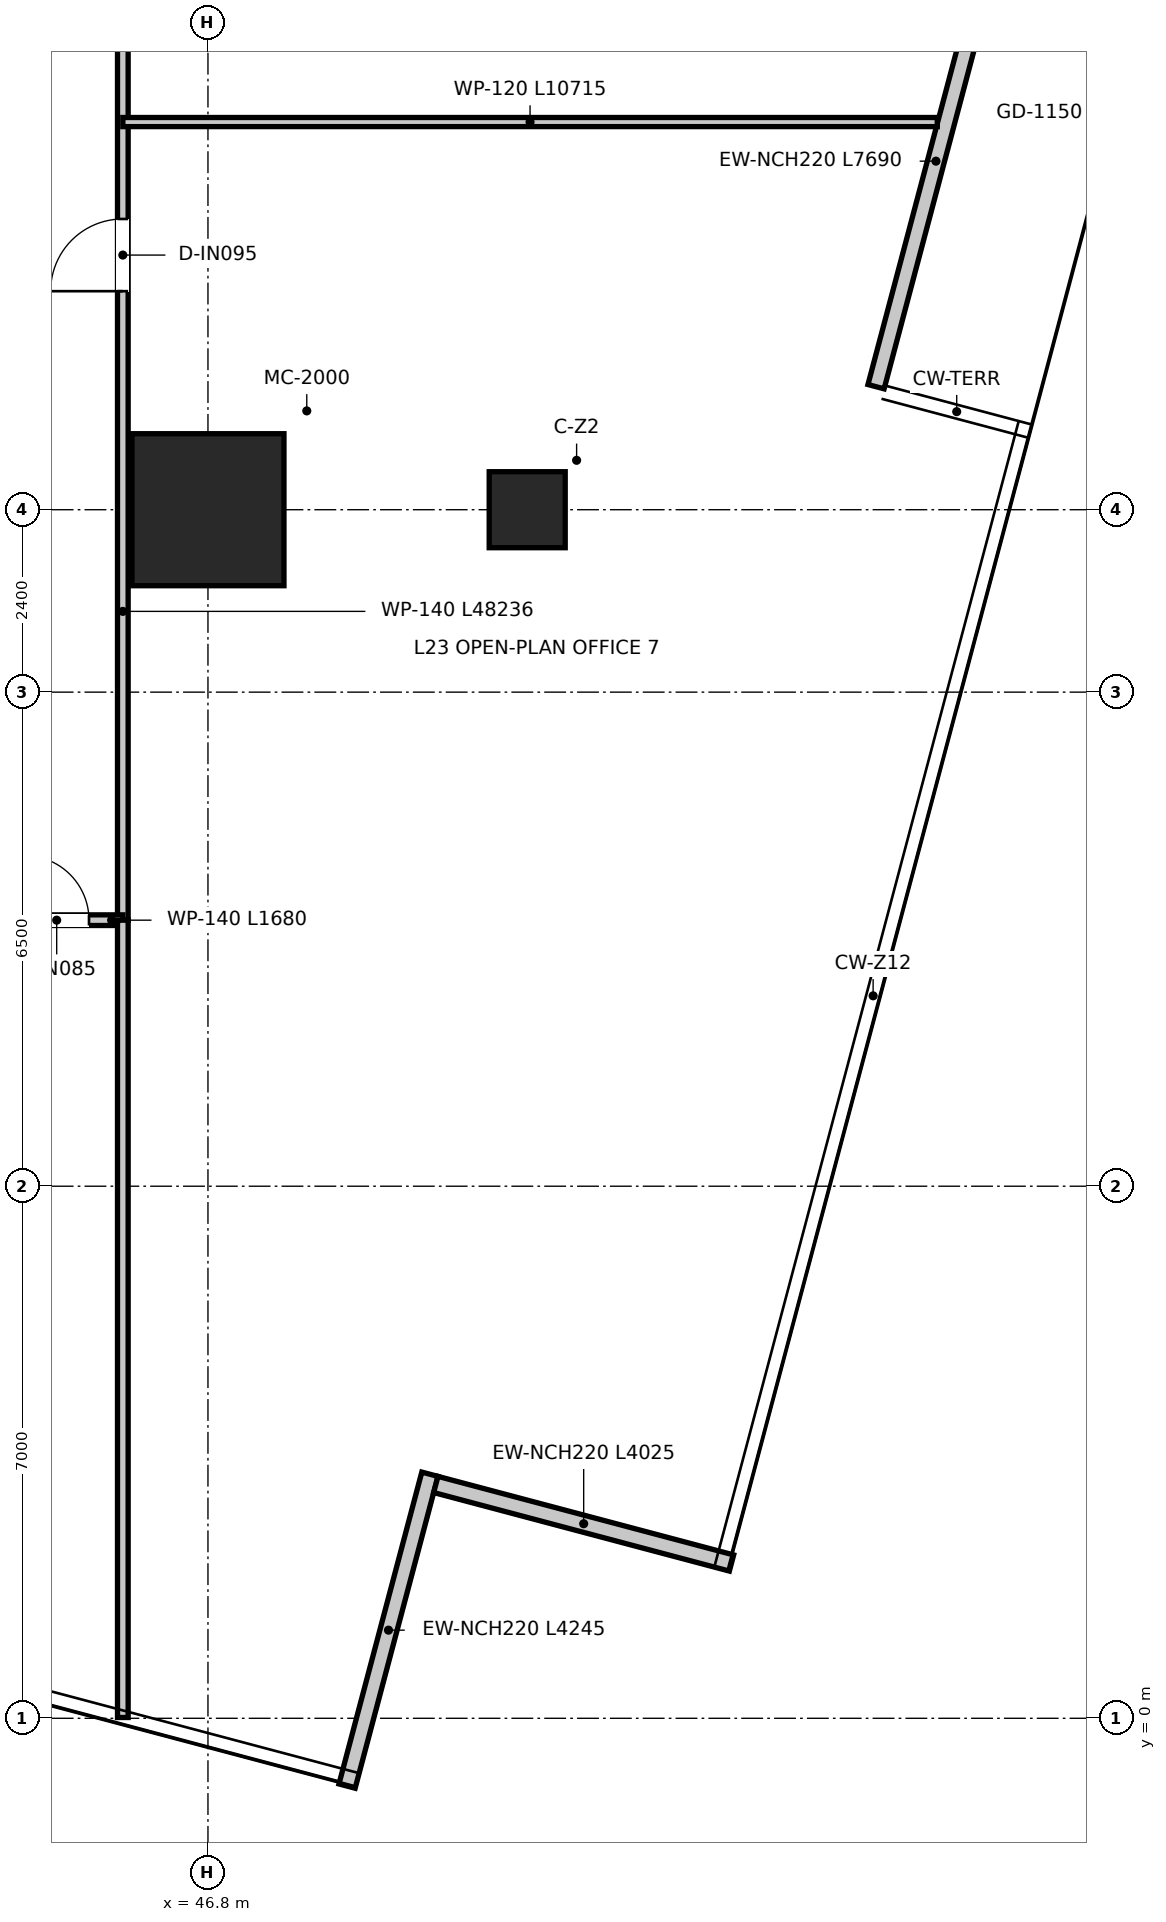
"""IFC4 building model, lengths in metres.
Left out: names, types, materials, properties, quantities, classifications, styles, units other than length and angle.
Written with IfcOpenShell. Run it as: python <this file> out.ifc"""

import sys

from ifc_helpers import new_model, si_unit, direction, frame, frame_2d, origin, origin_2d, place, context, subcontext, project, spatial, rectangle, extrude, source, transform, mapped, element, fill, save


model = new_model("IFC4")
c1 = context("Model", 3, precision=1e-05, world=origin(), true_north=direction((0.0, 1.0)))
c2 = subcontext(c1, "Body", "Model", "MODEL_VIEW")
j1 = project(units=[si_unit("LENGTHUNIT", "METRE"), si_unit("PLANEANGLEUNIT", "RADIAN")], contexts=[c1])
p1 = place(None, origin())
s1 = spatial("IfcSite", under=j1, at=p1, CompositionType="ELEMENT")
p2 = place(p1, origin())
s2 = spatial("IfcBuilding", under=s1, at=p2, CompositionType="ELEMENT")
p3 = place(p2, frame((0.0, 0.0, 97.95)))
s3 = spatial("IfcBuildingStorey", under=s2, at=p3, CompositionType="ELEMENT", Elevation=97.95)
m1 = source(origin(), c2, "Body", "SweptSolid", [
    extrude(rectangle(XDim=2.0, YDim=2.0, at=origin_2d()), origin(), (0.0, 0.0, 1.0), 3.95),
])
p4 = place(p3, frame((46.8, 15.9, 0.0), z_axis=(0.0, 0.0, 1.0), x_axis=(1.0, 0.0, 0.0)))
e1 = element("IfcColumn", 1, at=p4, inside=s3, PredefinedType="USERDEFINED", context=c2, shape_type="MappedRepresentation", body=[
    mapped(m1, transform((0.0, 0.0, 0.0), x_axis=(1.0, 0.0, 0.0), y_axis=(0.0, 1.0, 0.0), z_axis=(0.0, 0.0, 1.0), scale=1.0)),
])
m2 = source(origin(), c2, "Body", "SweptSolid", [
    extrude(rectangle(XDim=1.0, YDim=1.0, at=origin_2d()), origin(), (0.0, 0.0, 1.0), 3.95),
])
p5 = place(p3, frame((51.0, 15.9, 0.0), z_axis=(0.0, 0.0, 1.0), x_axis=(1.0, 0.0, 0.0)))
e2 = element("IfcColumn", 2, at=p5, inside=s3, PredefinedType="COLUMN", context=c2, shape_type="MappedRepresentation", body=[
    mapped(m2, transform((0.0, 0.0, 0.0), x_axis=(1.0, 0.0, 0.0), y_axis=(0.0, 1.0, 0.0), z_axis=(0.0, 0.0, 1.0), scale=1.0)),
])
p6 = place(p3, frame((48.63, -0.892, 0.0), z_axis=(0.0, 0.0, 1.0), x_axis=(0.256692391399, 0.966493153725, 0.0)))
e3 = element("IfcWall", 3, at=p6, inside=s3, PredefinedType="ELEMENTEDWALL", context=c2, shape_type="SweptSolid", body=[
    extrude(rectangle(XDim=4.245, YDim=0.22, at=frame_2d((2.123, 0.0))), origin(), (0.0, 0.0, 1.0), 3.67),
])
p7 = place(p3, frame((49.798, 3.076, 0.0), z_axis=(0.0, 0.0, 1.0), x_axis=(0.966492181189, -0.256696053144, 0.0)))
e4 = element("IfcWall", 4, at=p7, inside=s3, PredefinedType="ELEMENTEDWALL", context=c2, shape_type="SweptSolid", body=[
    extrude(rectangle(XDim=4.025, YDim=0.22, at=frame_2d((2.012, 0.0))), origin(), (0.0, 0.0, 1.0), 3.67),
])
p8 = place(p3, frame((57.563, 24.951, 0.0), z_axis=(0.0, 0.0, 1.0), x_axis=(-0.256717978083, -0.966486357756, 0.0)))
e5 = element("IfcWall", 5, at=p8, inside=s3, PredefinedType="ELEMENTEDWALL", context=c2, shape_type="SweptSolid", body=[
    extrude(rectangle(XDim=7.69, YDim=0.22, at=frame_2d((3.845, 0.0))), origin(), (0.0, 0.0, 1.0), 3.67),
])
p9 = place(p8, frame((0.45, 0.0, 0.0)))
e6 = element("IfcOpeningElement", 6, at=p9, cuts=e5, PredefinedType="OPENING", context=c2, shape_type="SweptSolid", body=[
    extrude(rectangle(XDim=0.95, YDim=2.1, at=frame_2d((0.475, 1.05))), frame((0.0, 0.12, 0.0), z_axis=(0.0, -1.0, 0.0), x_axis=(1.0, 0.0, 0.0)), (0.0, 0.0, 1.0), 0.24),
])
p10 = place(p3, frame((45.68, 10.5, 0.0), z_axis=(0.0, 0.0, 1.0), x_axis=(0.0, 1.0, 0.0)))
e7 = element("IfcWall", 7, at=p10, inside=s3, PredefinedType="PARTITIONING", context=c2, shape_type="SweptSolid", body=[
    extrude(rectangle(XDim=25.62, YDim=0.14, at=frame_2d((12.81, 0.0))), origin(), (0.0, 0.0, 1.0), 2.97),
])
p11 = place(p10, frame((8.275, 0.0, 0.0)))
e8 = element("IfcOpeningElement", 8, at=p11, cuts=e7, PredefinedType="OPENING", context=c2, shape_type="SweptSolid", body=[
    extrude(rectangle(XDim=0.95, YDim=2.1, at=frame_2d((0.475, 1.05))), frame((0.0, 0.08, 0.0), z_axis=(0.0, -1.0, 0.0), x_axis=(1.0, 0.0, 0.0)), (0.0, 0.0, 1.0), 0.16),
])
p12 = place(p10, frame((14.025, 0.0, 0.0)))
e9 = element("IfcOpeningElement", 9, at=p12, cuts=e7, PredefinedType="OPENING", context=c2, shape_type="SweptSolid", body=[
    extrude(rectangle(XDim=0.95, YDim=2.1, at=frame_2d((0.475, 1.05))), frame((0.0, 0.08, 0.0), z_axis=(0.0, -1.0, 0.0), x_axis=(1.0, 0.0, 0.0)), (0.0, 0.0, 1.0), 0.16),
])
p13 = place(p10, frame((20.875, 0.0, 0.0)))
e10 = element("IfcOpeningElement", 10, at=p13, cuts=e7, PredefinedType="OPENING", context=c2, shape_type="SweptSolid", body=[
    extrude(rectangle(XDim=0.95, YDim=2.1, at=frame_2d((0.475, 1.05))), frame((0.0, 0.08, 0.0), z_axis=(0.0, -1.0, 0.0), x_axis=(1.0, 0.0, 0.0)), (0.0, 0.0, 1.0), 0.16),
])
p14 = place(p3, frame((44.0, 10.5, 0.0), z_axis=(0.0, 0.0, 1.0), x_axis=(1.0, 0.0, 0.0)))
e11 = element("IfcWall", 11, at=p14, inside=s3, PredefinedType="PARTITIONING", context=c2, shape_type="SweptSolid", body=[
    extrude(rectangle(XDim=1.68, YDim=0.14, at=frame_2d((0.84, 0.0))), origin(), (0.0, 0.0, 1.0), 3.67),
])
p15 = place(p14, frame((0.385, 0.0, 0.0)))
e12 = element("IfcOpeningElement", 12, at=p15, cuts=e11, PredefinedType="OPENING", context=c2, shape_type="SweptSolid", body=[
    extrude(rectangle(XDim=0.85, YDim=2.1, at=frame_2d((0.425, 1.05))), frame((0.0, 0.08, 0.0), z_axis=(0.0, -1.0, 0.0), x_axis=(1.0, 0.0, 0.0)), (0.0, 0.0, 1.0), 0.16),
])
p16 = place(p3, frame((45.68, 0.01, 0.0), z_axis=(0.0, 0.0, 1.0), x_axis=(0.0, 1.0, 0.0)))
e13 = element("IfcWall", 13, at=p16, inside=s3, PredefinedType="PARTITIONING", context=c2, shape_type="SweptSolid", body=[
    extrude(rectangle(XDim=10.49, YDim=0.14, at=frame_2d((5.245, 0.0))), origin(), (0.0, 0.0, 1.0), 3.67),
])
p17 = place(p3, frame((45.68, 21.0, 0.0), z_axis=(0.0, 0.0, 1.0), x_axis=(1.0, 0.0, 0.0)))
e14 = element("IfcWall", 14, at=p17, inside=s3, PredefinedType="PARTITIONING", context=c2, shape_type="SweptSolid", body=[
    extrude(rectangle(XDim=10.715, YDim=0.12, at=frame_2d((5.358, 0.0))), origin(), (0.0, 0.0, 1.0), 2.97),
])
p18 = place(p11, origin())
e15 = element("IfcDoor", 15, at=p18, inside=s3, OperationType="SINGLE_SWING_LEFT", PredefinedType="DOOR", context=c2, shape_type="SweptSolid", body=[
    extrude(rectangle(XDim=0.95, YDim=2.1, at=frame_2d((0.475, 1.05))), frame((0.0, 0.025, 0.0), z_axis=(0.0, -1.0, 0.0), x_axis=(1.0, 0.0, 0.0)), (0.0, 0.0, 1.0), 0.05),
])
fill(e8, e15)
p19 = place(p15, origin())
e16 = element("IfcDoor", 16, at=p19, inside=s3, OperationType="SINGLE_SWING_LEFT", PredefinedType="DOOR", context=c2, shape_type="SweptSolid", body=[
    extrude(rectangle(XDim=0.85, YDim=2.1, at=frame_2d((0.425, 1.05))), frame((0.0, 0.025, 0.0), z_axis=(0.0, -1.0, 0.0), x_axis=(1.0, 0.0, 0.0)), (0.0, 0.0, 1.0), 0.05),
])
fill(e12, e16)
save(model, sys.argv[1])
